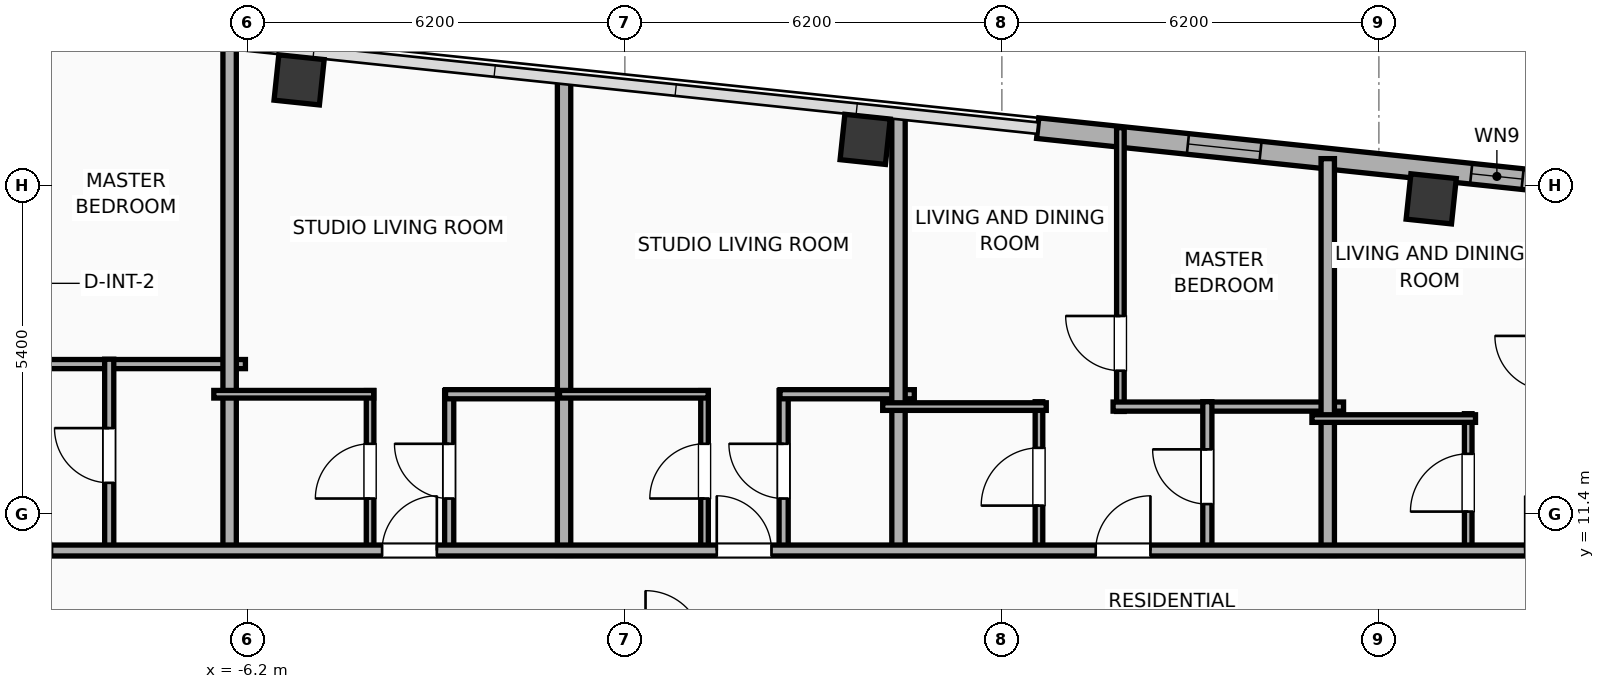
"""IFC4 building model, lengths in metres.
Left out: names, types, materials, properties, quantities, classifications, styles, units other than length and angle.
Written with IfcOpenShell. Run it as: python <this file> out.ifc"""

import sys

from ifc_helpers import new_model, si_unit, direction, frame, frame_2d, origin, origin_2d, place, context, subcontext, project, spatial, rectangle, hollow_rectangle, extrude, element, fill, save


model = new_model("IFC4")
c1 = context("Model", 3, precision=1e-05, world=origin(), true_north=direction((0.0, 1.0)))
c2 = subcontext(c1, "Body", "Model", "MODEL_VIEW")
j1 = project(units=[si_unit("LENGTHUNIT", "METRE"), si_unit("PLANEANGLEUNIT", "RADIAN")], contexts=[c1])
p1 = place(None, origin())
s1 = spatial("IfcSite", under=j1, at=p1, CompositionType="ELEMENT")
p2 = place(p1, origin())
s2 = spatial("IfcBuilding", under=s1, at=p2, CompositionType="ELEMENT")
p3 = place(p2, frame((0.0, 0.0, 275.6)))
s3 = spatial("IfcBuildingStorey", under=s2, at=p3, CompositionType="ELEMENT", Elevation=275.6)
for number, where, z_axis, x_axis in (
    (1, (13.26, 16.583, 0.0), (0.0, 0.0, 1.0), (0.995, -0.105, 0.0)),
    (2, (3.952, 17.561, 0.0), (0.0, 0.0, 1.0), (0.995, -0.105, 0.0)),
    (3, (-5.357, 18.54, 0.0), (0.0, 0.0, 1.0), (0.995, -0.105, 0.0)),
):
    element("IfcColumn", number, at=place(p3, frame(where, z_axis=z_axis, x_axis=x_axis)), inside=s3, PredefinedType="COLUMN", context=c2, shape_type="SweptSolid", body=[
        extrude(hollow_rectangle(XDim=0.75, YDim=0.75, WallThickness=0.025, at=origin_2d()), origin(), (0.0, 0.0, 1.0), 3.9),
    ])
p4 = place(p3, frame((6.789, 17.746, 0.0), z_axis=(0.0, 0.0, 1.0), x_axis=(0.994521594531, -0.104531325504, 0.0)))
e4 = element("IfcWall", 4, at=p4, inside=s3, PredefinedType="ELEMENTEDWALL", context=c2, shape_type="SweptSolid", body=[
    extrude(rectangle(XDim=15.901, YDim=0.34, at=frame_2d((7.95, 0.0))), origin(), (0.0, 0.0, 1.0), 3.65),
])
p5 = place(p4, frame((2.484, 0.0, 0.75)))
e5 = element("IfcOpeningElement", 5, at=p5, cuts=e4, PredefinedType="OPENING", context=c2, shape_type="SweptSolid", body=[
    extrude(rectangle(XDim=1.2, YDim=2.05, at=frame_2d((0.6, 1.025))), frame((0.0, 0.18, 0.0), z_axis=(0.0, -1.0, 0.0), x_axis=(1.0, 0.0, 0.0)), (0.0, 0.0, 1.0), 0.36),
])
p6 = place(p4, frame((7.168, 0.0, 0.75)))
e6 = element("IfcOpeningElement", 6, at=p6, cuts=e4, PredefinedType="OPENING", context=c2, shape_type="SweptSolid", body=[
    extrude(rectangle(XDim=0.85, YDim=2.05, at=frame_2d((0.425, 1.025))), frame((0.0, 0.18, 0.0), z_axis=(0.0, -1.0, 0.0), x_axis=(1.0, 0.0, 0.0)), (0.0, 0.0, 1.0), 0.36),
])
p7 = place(p4, frame((9.582, 0.0, 0.75)))
e7 = element("IfcOpeningElement", 7, at=p7, cuts=e4, PredefinedType="OPENING", context=c2, shape_type="SweptSolid", body=[
    extrude(rectangle(XDim=1.2, YDim=2.05, at=frame_2d((0.6, 1.025))), frame((0.0, 0.18, 0.0), z_axis=(0.0, -1.0, 0.0), x_axis=(1.0, 0.0, 0.0)), (0.0, 0.0, 1.0), 0.36),
])
p8 = place(p4, frame((12.852, 0.0, 0.75)))
e8 = element("IfcOpeningElement", 8, at=p8, cuts=e4, PredefinedType="OPENING", context=c2, shape_type="SweptSolid", body=[
    extrude(rectangle(XDim=1.2, YDim=2.05, at=frame_2d((0.6, 1.025))), frame((0.0, 0.18, 0.0), z_axis=(0.0, -1.0, 0.0), x_axis=(1.0, 0.0, 0.0)), (0.0, 0.0, 1.0), 0.36),
])
p9 = place(p3, frame((-10.03, 13.866, 0.0), z_axis=(0.0, 0.0, 1.0), x_axis=(1.0, 0.0, 0.0)))
e9 = element("IfcWall", 9, at=p9, inside=s3, PredefinedType="PLUMBINGWALL", context=c2, shape_type="SweptSolid", body=[
    extrude(rectangle(XDim=3.79, YDim=0.15, at=frame_2d((1.895, 0.0))), origin(), (0.0, 0.0, 1.0), 3.65),
])
p10 = place(p3, frame((-8.48, 10.78, 0.0), z_axis=(0.0, 0.0, 1.0), x_axis=(0.0, 1.0, 0.0)))
e10 = element("IfcWall", 10, at=p10, inside=s3, PredefinedType="PLUMBINGWALL", context=c2, shape_type="SweptSolid", body=[
    extrude(rectangle(XDim=3.166, YDim=0.15, at=frame_2d((1.583, 0.0))), origin(), (0.0, 0.0, 1.0), 3.65),
])
p11 = place(p10, frame((1.133, 0.0, 0.0)))
e11 = element("IfcOpeningElement", 11, at=p11, cuts=e10, PredefinedType="OPENING", context=c2, shape_type="SweptSolid", body=[
    extrude(rectangle(XDim=0.9, YDim=2.05, at=frame_2d((0.45, 1.025))), frame((0.0, 0.085, 0.0), z_axis=(0.0, -1.0, 0.0), x_axis=(1.0, 0.0, 0.0)), (0.0, 0.0, 1.0), 0.17),
])
p12 = place(p3, frame((-6.5, 10.72, 0.0), z_axis=(0.0, 0.0, 1.0), x_axis=(0.0, 1.0, 0.0)))
e12 = element("IfcWall", 12, at=p12, inside=s3, PredefinedType="PARTITIONING", context=c2, shape_type="SweptSolid", body=[
    extrude(rectangle(XDim=8.423, YDim=0.22, at=frame_2d((4.211, 0.0))), origin(), (0.0, 0.0, 1.0), 3.65),
])
p13 = place(p3, frame((-4.19, 10.78, 0.0), z_axis=(0.0, 0.0, 1.0), x_axis=(0.0, 1.0, 0.0)))
e13 = element("IfcWall", 13, at=p13, inside=s3, PredefinedType="PARTITIONING", context=c2, shape_type="SweptSolid", body=[
    extrude(rectangle(XDim=2.65, YDim=0.125, at=frame_2d((1.325, 0.0))), origin(), (0.0, 0.0, 1.0), 3.65),
])
p14 = place(p13, frame((0.875, 0.0, 0.0)))
e14 = element("IfcOpeningElement", 14, at=p14, cuts=e13, PredefinedType="OPENING", context=c2, shape_type="SweptSolid", body=[
    extrude(rectangle(XDim=0.9, YDim=2.05, at=frame_2d((0.45, 1.025))), frame((0.0, 0.073, 0.0), z_axis=(0.0, -1.0, 0.0), x_axis=(1.0, 0.0, 0.0)), (0.0, 0.0, 1.0), 0.145),
])
p15 = place(p3, frame((-2.889, 10.78, 0.0), z_axis=(0.0, 0.0, 1.0), x_axis=(0.0, 1.0, 0.0)))
e15 = element("IfcWall", 15, at=p15, inside=s3, PredefinedType="PLUMBINGWALL", context=c2, shape_type="SweptSolid", body=[
    extrude(rectangle(XDim=2.65, YDim=0.15, at=frame_2d((1.325, 0.0))), origin(), (0.0, 0.0, 1.0), 3.65),
])
p16 = place(p15, frame((0.875, 0.0, 0.0)))
e16 = element("IfcOpeningElement", 16, at=p16, cuts=e15, PredefinedType="OPENING", context=c2, shape_type="SweptSolid", body=[
    extrude(rectangle(XDim=0.9, YDim=2.05, at=frame_2d((0.45, 1.025))), frame((0.0, 0.085, 0.0), z_axis=(0.0, -1.0, 0.0), x_axis=(1.0, 0.0, 0.0)), (0.0, 0.0, 1.0), 0.17),
])
p17 = place(p3, frame((-6.76, 13.37, 0.0), z_axis=(0.0, 0.0, 1.0), x_axis=(1.0, 0.0, 0.0)))
e17 = element("IfcWall", 17, at=p17, inside=s3, PredefinedType="PARTITIONING", context=c2, shape_type="SweptSolid", body=[
    extrude(rectangle(XDim=2.63, YDim=0.125, at=frame_2d((1.315, 0.0))), origin(), (0.0, 0.0, 1.0), 3.65),
])
p18 = place(p3, frame((-2.949, 13.37, 0.0), z_axis=(0.0, 0.0, 1.0), x_axis=(1.0, 0.0, 0.0)))
e18 = element("IfcWall", 18, at=p18, inside=s3, PredefinedType="PLUMBINGWALL", context=c2, shape_type="SweptSolid", body=[
    extrude(rectangle(XDim=2.024, YDim=0.15, at=frame_2d((1.012, 0.0))), origin(), (0.0, 0.0, 1.0), 3.65),
])
p19 = place(p3, frame((-1.0, 10.72, 0.0), z_axis=(0.0, 0.0, 1.0), x_axis=(0.0, 1.0, 0.0)))
e19 = element("IfcWall", 19, at=p19, inside=s3, PredefinedType="PARTITIONING", context=c2, shape_type="SweptSolid", body=[
    extrude(rectangle(XDim=7.844, YDim=0.22, at=frame_2d((3.922, 0.0))), origin(), (0.0, 0.0, 1.0), 3.65),
])
p20 = place(p3, frame((1.31, 10.78, 0.0), z_axis=(0.0, 0.0, 1.0), x_axis=(0.0, 1.0, 0.0)))
e20 = element("IfcWall", 20, at=p20, inside=s3, PredefinedType="PARTITIONING", context=c2, shape_type="SweptSolid", body=[
    extrude(rectangle(XDim=2.65, YDim=0.125, at=frame_2d((1.325, 0.0))), origin(), (0.0, 0.0, 1.0), 3.65),
])
p21 = place(p20, frame((0.875, 0.0, 0.0)))
e21 = element("IfcOpeningElement", 21, at=p21, cuts=e20, PredefinedType="OPENING", context=c2, shape_type="SweptSolid", body=[
    extrude(rectangle(XDim=0.9, YDim=2.05, at=frame_2d((0.45, 1.025))), frame((0.0, 0.073, 0.0), z_axis=(0.0, -1.0, 0.0), x_axis=(1.0, 0.0, 0.0)), (0.0, 0.0, 1.0), 0.145),
])
p22 = place(p3, frame((2.611, 10.78, 0.0), z_axis=(0.0, 0.0, 1.0), x_axis=(0.0, 1.0, 0.0)))
e22 = element("IfcWall", 22, at=p22, inside=s3, PredefinedType="PLUMBINGWALL", context=c2, shape_type="SweptSolid", body=[
    extrude(rectangle(XDim=2.65, YDim=0.15, at=frame_2d((1.325, 0.0))), origin(), (0.0, 0.0, 1.0), 3.65),
])
p23 = place(p22, frame((0.875, 0.0, 0.0)))
e23 = element("IfcOpeningElement", 23, at=p23, cuts=e22, PredefinedType="OPENING", context=c2, shape_type="SweptSolid", body=[
    extrude(rectangle(XDim=0.9, YDim=2.05, at=frame_2d((0.45, 1.025))), frame((0.0, 0.085, 0.0), z_axis=(0.0, -1.0, 0.0), x_axis=(1.0, 0.0, 0.0)), (0.0, 0.0, 1.0), 0.17),
])
p24 = place(p3, frame((-1.075, 13.37, 0.0), z_axis=(0.0, 0.0, 1.0), x_axis=(1.0, 0.0, 0.0)))
e24 = element("IfcWall", 24, at=p24, inside=s3, PredefinedType="PARTITIONING", context=c2, shape_type="SweptSolid", body=[
    extrude(rectangle(XDim=2.445, YDim=0.125, at=frame_2d((1.223, 0.0))), origin(), (0.0, 0.0, 1.0), 3.65),
])
p25 = place(p3, frame((2.551, 13.37, 0.0), z_axis=(0.0, 0.0, 1.0), x_axis=(1.0, 0.0, 0.0)))
e25 = element("IfcWall", 25, at=p25, inside=s3, PredefinedType="PLUMBINGWALL", context=c2, shape_type="SweptSolid", body=[
    extrude(rectangle(XDim=2.209, YDim=0.15, at=frame_2d((1.104, 0.0))), origin(), (0.0, 0.0, 1.0), 3.65),
])
p26 = place(p3, frame((4.5, 10.72, 0.0), z_axis=(0.0, 0.0, 1.0), x_axis=(0.0, 1.0, 0.0)))
e26 = element("IfcWall", 26, at=p26, inside=s3, PredefinedType="PARTITIONING", context=c2, shape_type="SweptSolid", body=[
    extrude(rectangle(XDim=7.266, YDim=0.22, at=frame_2d((3.633, 0.0))), origin(), (0.0, 0.0, 1.0), 3.65),
])
p27 = place(p3, frame((8.149, 13.087, 0.0), z_axis=(0.0, 0.0, 1.0), x_axis=(0.0, 1.0, 0.0)))
e27 = element("IfcWall", 27, at=p27, inside=s3, PredefinedType="PARTITIONING", context=c2, shape_type="SweptSolid", body=[
    extrude(rectangle(XDim=4.667, YDim=0.125, at=frame_2d((2.333, 0.0))), origin(), (0.0, 0.0, 1.0), 3.65),
])
p28 = place(p27, frame((0.67, 0.0, 0.0)))
e28 = element("IfcOpeningElement", 28, at=p28, cuts=e27, PredefinedType="OPENING", context=c2, shape_type="SweptSolid", body=[
    extrude(rectangle(XDim=0.9, YDim=2.05, at=frame_2d((0.45, 1.025))), frame((0.0, 0.073, 0.0), z_axis=(0.0, -1.0, 0.0), x_axis=(1.0, 0.0, 0.0)), (0.0, 0.0, 1.0), 0.145),
])
p29 = place(p3, frame((8.029, 13.167, 0.0), z_axis=(0.0, 0.0, 1.0), x_axis=(1.0, 0.0, 0.0)))
e29 = element("IfcWall", 29, at=p29, inside=s3, PredefinedType="PLUMBINGWALL", context=c2, shape_type="SweptSolid", body=[
    extrude(rectangle(XDim=3.79, YDim=0.15, at=frame_2d((1.895, 0.0))), origin(), (0.0, 0.0, 1.0), 3.65),
])
p30 = place(p3, frame((6.81, 10.78, 0.0), z_axis=(0.0, 0.0, 1.0), x_axis=(0.0, 1.0, 0.0)))
e30 = element("IfcWall", 30, at=p30, inside=s3, PredefinedType="PARTITIONING", context=c2, shape_type="SweptSolid", body=[
    extrude(rectangle(XDim=2.467, YDim=0.125, at=frame_2d((1.233, 0.0))), origin(), (0.0, 0.0, 1.0), 3.65),
])
p31 = place(p30, frame((0.759, 0.0, 0.0)))
e31 = element("IfcOpeningElement", 31, at=p31, cuts=e30, PredefinedType="OPENING", context=c2, shape_type="SweptSolid", body=[
    extrude(rectangle(XDim=0.95, YDim=2.05, at=frame_2d((0.475, 1.025))), frame((0.0, 0.073, 0.0), z_axis=(0.0, -1.0, 0.0), x_axis=(1.0, 0.0, 0.0)), (0.0, 0.0, 1.0), 0.145),
])
p32 = place(p3, frame((4.24, 13.167, 0.0), z_axis=(0.0, 0.0, 1.0), x_axis=(1.0, 0.0, 0.0)))
e32 = element("IfcWall", 32, at=p32, inside=s3, PredefinedType="PARTITIONING", context=c2, shape_type="SweptSolid", body=[
    extrude(rectangle(XDim=2.69, YDim=0.125, at=frame_2d((1.345, 0.0))), origin(), (0.0, 0.0, 1.0), 3.65),
])
p33 = place(p3, frame((9.579, 10.78, 0.0), z_axis=(0.0, 0.0, 1.0), x_axis=(0.0, 1.0, 0.0)))
e33 = element("IfcWall", 33, at=p33, inside=s3, PredefinedType="PLUMBINGWALL", context=c2, shape_type="SweptSolid", body=[
    extrude(rectangle(XDim=2.467, YDim=0.15, at=frame_2d((1.233, 0.0))), origin(), (0.0, 0.0, 1.0), 3.65),
])
p34 = place(p33, frame((0.783, 0.0, 0.0)))
e34 = element("IfcOpeningElement", 34, at=p34, cuts=e33, PredefinedType="OPENING", context=c2, shape_type="SweptSolid", body=[
    extrude(rectangle(XDim=0.9, YDim=2.05, at=frame_2d((0.45, 1.025))), frame((0.0, 0.085, 0.0), z_axis=(0.0, -1.0, 0.0), x_axis=(1.0, 0.0, 0.0)), (0.0, 0.0, 1.0), 0.17),
])
p35 = place(p3, frame((11.559, 10.72, 0.0), z_axis=(0.0, 0.0, 1.0), x_axis=(0.0, 1.0, 0.0)))
e35 = element("IfcWall", 35, at=p35, inside=s3, PredefinedType="PARTITIONING", context=c2, shape_type="SweptSolid", body=[
    extrude(rectangle(XDim=6.524, YDim=0.22, at=frame_2d((3.262, 0.0))), origin(), (0.0, 0.0, 1.0), 3.65),
])
p36 = place(p3, frame((13.869, 10.78, 0.0), z_axis=(0.0, 0.0, 1.0), x_axis=(0.0, 1.0, 0.0)))
e36 = element("IfcWall", 36, at=p36, inside=s3, PredefinedType="PARTITIONING", context=c2, shape_type="SweptSolid", body=[
    extrude(rectangle(XDim=2.27, YDim=0.125, at=frame_2d((1.135, 0.0))), origin(), (0.0, 0.0, 1.0), 3.65),
])
p37 = place(p36, frame((0.66, 0.0, 0.0)))
e37 = element("IfcOpeningElement", 37, at=p37, cuts=e36, PredefinedType="OPENING", context=c2, shape_type="SweptSolid", body=[
    extrude(rectangle(XDim=0.95, YDim=2.05, at=frame_2d((0.475, 1.025))), frame((0.0, 0.073, 0.0), z_axis=(0.0, -1.0, 0.0), x_axis=(1.0, 0.0, 0.0)), (0.0, 0.0, 1.0), 0.145),
])
p38 = place(p3, frame((11.299, 12.97, 0.0), z_axis=(0.0, 0.0, 1.0), x_axis=(1.0, 0.0, 0.0)))
e38 = element("IfcWall", 38, at=p38, inside=s3, PredefinedType="PARTITIONING", context=c2, shape_type="SweptSolid", body=[
    extrude(rectangle(XDim=2.69, YDim=0.125, at=frame_2d((1.345, 0.0))), origin(), (0.0, 0.0, 1.0), 3.65),
])
p39 = place(p3, frame((-28.443, 10.8, 0.0), z_axis=(0.0, 0.0, 1.0), x_axis=(1.0, 0.0, 0.0)))
e39 = element("IfcWall", 39, at=p39, inside=s3, PredefinedType="PARTITIONING", context=c2, shape_type="SweptSolid", body=[
    extrude(rectangle(XDim=53.956, YDim=0.18, at=frame_2d((26.978, 0.0))), origin(), (0.0, 0.0, 1.0), 3.65),
])
p40 = place(p39, frame((3.213, 0.0, 0.0)))
e40 = element("IfcOpeningElement", 40, at=p40, cuts=e39, PredefinedType="OPENING", context=c2, shape_type="SweptSolid", body=[
    extrude(rectangle(XDim=1.15, YDim=2.05, at=frame_2d((0.575, 1.025))), frame((0.0, 0.1, 0.0), z_axis=(0.0, -1.0, 0.0), x_axis=(1.0, 0.0, 0.0)), (0.0, 0.0, 1.0), 0.2),
])
p41 = place(p39, frame((10.556, 0.0, 0.0)))
e41 = element("IfcOpeningElement", 41, at=p41, cuts=e39, PredefinedType="OPENING", context=c2, shape_type="SweptSolid", body=[
    extrude(rectangle(XDim=1.15, YDim=2.05, at=frame_2d((0.575, 1.025))), frame((0.0, 0.1, 0.0), z_axis=(0.0, -1.0, 0.0), x_axis=(1.0, 0.0, 0.0)), (0.0, 0.0, 1.0), 0.2),
])
p42 = place(p39, frame((17.872, 0.0, 0.0)))
e42 = element("IfcOpeningElement", 42, at=p42, cuts=e39, PredefinedType="OPENING", context=c2, shape_type="SweptSolid", body=[
    extrude(rectangle(XDim=1.15, YDim=2.05, at=frame_2d((0.575, 1.025))), frame((0.0, 0.1, 0.0), z_axis=(0.0, -1.0, 0.0), x_axis=(1.0, 0.0, 0.0)), (0.0, 0.0, 1.0), 0.2),
])
p43 = place(p39, frame((24.45, 0.0, 0.0)))
e43 = element("IfcOpeningElement", 43, at=p43, cuts=e39, PredefinedType="OPENING", context=c2, shape_type="SweptSolid", body=[
    extrude(rectangle(XDim=0.9, YDim=2.05, at=frame_2d((0.45, 1.025))), frame((0.0, 0.1, 0.0), z_axis=(0.0, -1.0, 0.0), x_axis=(1.0, 0.0, 0.0)), (0.0, 0.0, 1.0), 0.2),
])
p44 = place(p39, frame((29.954, 0.0, 0.0)))
e44 = element("IfcOpeningElement", 44, at=p44, cuts=e39, PredefinedType="OPENING", context=c2, shape_type="SweptSolid", body=[
    extrude(rectangle(XDim=0.9, YDim=2.05, at=frame_2d((0.45, 1.025))), frame((0.0, 0.1, 0.0), z_axis=(0.0, -1.0, 0.0), x_axis=(1.0, 0.0, 0.0)), (0.0, 0.0, 1.0), 0.2),
])
p45 = place(p39, frame((36.186, 0.0, 0.0)))
e45 = element("IfcOpeningElement", 45, at=p45, cuts=e39, PredefinedType="OPENING", context=c2, shape_type="SweptSolid", body=[
    extrude(rectangle(XDim=0.9, YDim=2.05, at=frame_2d((0.45, 1.025))), frame((0.0, 0.1, 0.0), z_axis=(0.0, -1.0, 0.0), x_axis=(1.0, 0.0, 0.0)), (0.0, 0.0, 1.0), 0.2),
])
p46 = place(p39, frame((43.249, 0.0, 0.0)))
e46 = element("IfcOpeningElement", 46, at=p46, cuts=e39, PredefinedType="OPENING", context=c2, shape_type="SweptSolid", body=[
    extrude(rectangle(XDim=0.9, YDim=2.05, at=frame_2d((0.45, 1.025))), frame((0.0, 0.1, 0.0), z_axis=(0.0, -1.0, 0.0), x_axis=(1.0, 0.0, 0.0)), (0.0, 0.0, 1.0), 0.2),
])
p47 = place(p39, frame((50.311, 0.0, 0.0)))
e47 = element("IfcOpeningElement", 47, at=p47, cuts=e39, PredefinedType="OPENING", context=c2, shape_type="SweptSolid", body=[
    extrude(rectangle(XDim=0.9, YDim=2.05, at=frame_2d((0.45, 1.025))), frame((0.0, 0.1, 0.0), z_axis=(0.0, -1.0, 0.0), x_axis=(1.0, 0.0, 0.0)), (0.0, 0.0, 1.0), 0.2),
])
p48 = place(p5, origin())
e48 = element("IfcWindow", 48, at=p48, inside=s3, PartitioningType="SINGLE_PANEL", PredefinedType="WINDOW", context=c2, shape_type="SweptSolid", body=[
    extrude(rectangle(XDim=1.2, YDim=2.05, at=frame_2d((0.6, 1.025))), frame((0.0, 0.03, 0.0), z_axis=(0.0, -1.0, 0.0), x_axis=(1.0, 0.0, 0.0)), (0.0, 0.0, 1.0), 0.06),
])
fill(e5, e48)
p49 = place(p6, origin())
e49 = element("IfcWindow", 49, at=p49, inside=s3, PartitioningType="SINGLE_PANEL", PredefinedType="WINDOW", context=c2, shape_type="SweptSolid", body=[
    extrude(rectangle(XDim=0.85, YDim=2.05, at=frame_2d((0.425, 1.025))), frame((0.0, 0.03, 0.0), z_axis=(0.0, -1.0, 0.0), x_axis=(1.0, 0.0, 0.0)), (0.0, 0.0, 1.0), 0.06),
])
fill(e6, e49)
p50 = place(p11, origin())
e50 = element("IfcDoor", 50, at=p50, inside=s3, OperationType="SINGLE_SWING_RIGHT", PredefinedType="DOOR", context=c2, shape_type="SweptSolid", body=[
    extrude(rectangle(XDim=0.9, YDim=2.05, at=frame_2d((0.45, 1.025))), frame((0.0, 0.025, 0.0), z_axis=(0.0, -1.0, 0.0), x_axis=(1.0, 0.0, 0.0)), (0.0, 0.0, 1.0), 0.05),
])
fill(e11, e50)
p51 = place(p14, origin())
e51 = element("IfcDoor", 51, at=p51, inside=s3, OperationType="SINGLE_SWING_LEFT", PredefinedType="DOOR", context=c2, shape_type="SweptSolid", body=[
    extrude(rectangle(XDim=0.9, YDim=2.05, at=frame_2d((0.45, 1.025))), frame((0.0, 0.025, 0.0), z_axis=(0.0, -1.0, 0.0), x_axis=(1.0, 0.0, 0.0)), (0.0, 0.0, 1.0), 0.05),
])
fill(e14, e51)
p52 = place(p16, origin())
e52 = element("IfcDoor", 52, at=p52, inside=s3, OperationType="SINGLE_SWING_RIGHT", PredefinedType="DOOR", context=c2, shape_type="SweptSolid", body=[
    extrude(rectangle(XDim=0.9, YDim=2.05, at=frame_2d((0.45, 1.025))), frame((0.0, 0.025, 0.0), z_axis=(0.0, -1.0, 0.0), x_axis=(1.0, 0.0, 0.0)), (0.0, 0.0, 1.0), 0.05),
])
fill(e16, e52)
p53 = place(p21, origin())
e53 = element("IfcDoor", 53, at=p53, inside=s3, OperationType="SINGLE_SWING_LEFT", PredefinedType="DOOR", context=c2, shape_type="SweptSolid", body=[
    extrude(rectangle(XDim=0.9, YDim=2.05, at=frame_2d((0.45, 1.025))), frame((0.0, 0.025, 0.0), z_axis=(0.0, -1.0, 0.0), x_axis=(1.0, 0.0, 0.0)), (0.0, 0.0, 1.0), 0.05),
])
fill(e21, e53)
p54 = place(p23, origin())
e54 = element("IfcDoor", 54, at=p54, inside=s3, OperationType="SINGLE_SWING_RIGHT", PredefinedType="DOOR", context=c2, shape_type="SweptSolid", body=[
    extrude(rectangle(XDim=0.9, YDim=2.05, at=frame_2d((0.45, 1.025))), frame((0.0, 0.025, 0.0), z_axis=(0.0, -1.0, 0.0), x_axis=(1.0, 0.0, 0.0)), (0.0, 0.0, 1.0), 0.05),
])
fill(e23, e54)
p55 = place(p28, origin())
e55 = element("IfcDoor", 55, at=p55, inside=s3, OperationType="SINGLE_SWING_RIGHT", PredefinedType="DOOR", context=c2, shape_type="SweptSolid", body=[
    extrude(rectangle(XDim=0.9, YDim=2.05, at=frame_2d((0.45, 1.025))), frame((0.0, 0.025, 0.0), z_axis=(0.0, -1.0, 0.0), x_axis=(1.0, 0.0, 0.0)), (0.0, 0.0, 1.0), 0.05),
])
fill(e28, e55)
p56 = place(p31, origin())
e56 = element("IfcDoor", 56, at=p56, inside=s3, OperationType="SINGLE_SWING_LEFT", PredefinedType="DOOR", context=c2, shape_type="SweptSolid", body=[
    extrude(rectangle(XDim=0.95, YDim=2.05, at=frame_2d((0.475, 1.025))), frame((0.0, 0.025, 0.0), z_axis=(0.0, -1.0, 0.0), x_axis=(1.0, 0.0, 0.0)), (0.0, 0.0, 1.0), 0.05),
])
fill(e31, e56)
p57 = place(p34, origin())
e57 = element("IfcDoor", 57, at=p57, inside=s3, OperationType="SINGLE_SWING_RIGHT", PredefinedType="DOOR", context=c2, shape_type="SweptSolid", body=[
    extrude(rectangle(XDim=0.9, YDim=2.05, at=frame_2d((0.45, 1.025))), frame((0.0, 0.025, 0.0), z_axis=(0.0, -1.0, 0.0), x_axis=(1.0, 0.0, 0.0)), (0.0, 0.0, 1.0), 0.05),
])
fill(e34, e57)
p58 = place(p37, origin())
e58 = element("IfcDoor", 58, at=p58, inside=s3, OperationType="SINGLE_SWING_LEFT", PredefinedType="DOOR", context=c2, shape_type="SweptSolid", body=[
    extrude(rectangle(XDim=0.95, YDim=2.05, at=frame_2d((0.475, 1.025))), frame((0.0, 0.025, 0.0), z_axis=(0.0, -1.0, 0.0), x_axis=(1.0, 0.0, 0.0)), (0.0, 0.0, 1.0), 0.05),
])
fill(e37, e58)
p59 = place(p43, origin())
e59 = element("IfcDoor", 59, at=p59, inside=s3, OperationType="SINGLE_SWING_RIGHT", PredefinedType="DOOR", context=c2, shape_type="SweptSolid", body=[
    extrude(rectangle(XDim=0.9, YDim=2.05, at=frame_2d((0.45, 1.025))), frame((0.0, 0.025, 0.0), z_axis=(0.0, -1.0, 0.0), x_axis=(1.0, 0.0, 0.0)), (0.0, 0.0, 1.0), 0.05),
])
fill(e43, e59)
p60 = place(p44, origin())
e60 = element("IfcDoor", 60, at=p60, inside=s3, OperationType="SINGLE_SWING_LEFT", PredefinedType="DOOR", context=c2, shape_type="SweptSolid", body=[
    extrude(rectangle(XDim=0.9, YDim=2.05, at=frame_2d((0.45, 1.025))), frame((0.0, 0.025, 0.0), z_axis=(0.0, -1.0, 0.0), x_axis=(1.0, 0.0, 0.0)), (0.0, 0.0, 1.0), 0.05),
])
fill(e44, e60)
p61 = place(p45, origin())
e61 = element("IfcDoor", 61, at=p61, inside=s3, OperationType="SINGLE_SWING_RIGHT", PredefinedType="DOOR", context=c2, shape_type="SweptSolid", body=[
    extrude(rectangle(XDim=0.9, YDim=2.05, at=frame_2d((0.45, 1.025))), frame((0.0, 0.025, 0.0), z_axis=(0.0, -1.0, 0.0), x_axis=(1.0, 0.0, 0.0)), (0.0, 0.0, 1.0), 0.05),
])
fill(e45, e61)
p62 = place(p46, origin())
e62 = element("IfcDoor", 62, at=p62, inside=s3, OperationType="SINGLE_SWING_LEFT", PredefinedType="DOOR", context=c2, shape_type="SweptSolid", body=[
    extrude(rectangle(XDim=0.9, YDim=2.05, at=frame_2d((0.45, 1.025))), frame((0.0, 0.025, 0.0), z_axis=(0.0, -1.0, 0.0), x_axis=(1.0, 0.0, 0.0)), (0.0, 0.0, 1.0), 0.05),
])
fill(e46, e62)
save(model, sys.argv[1])
